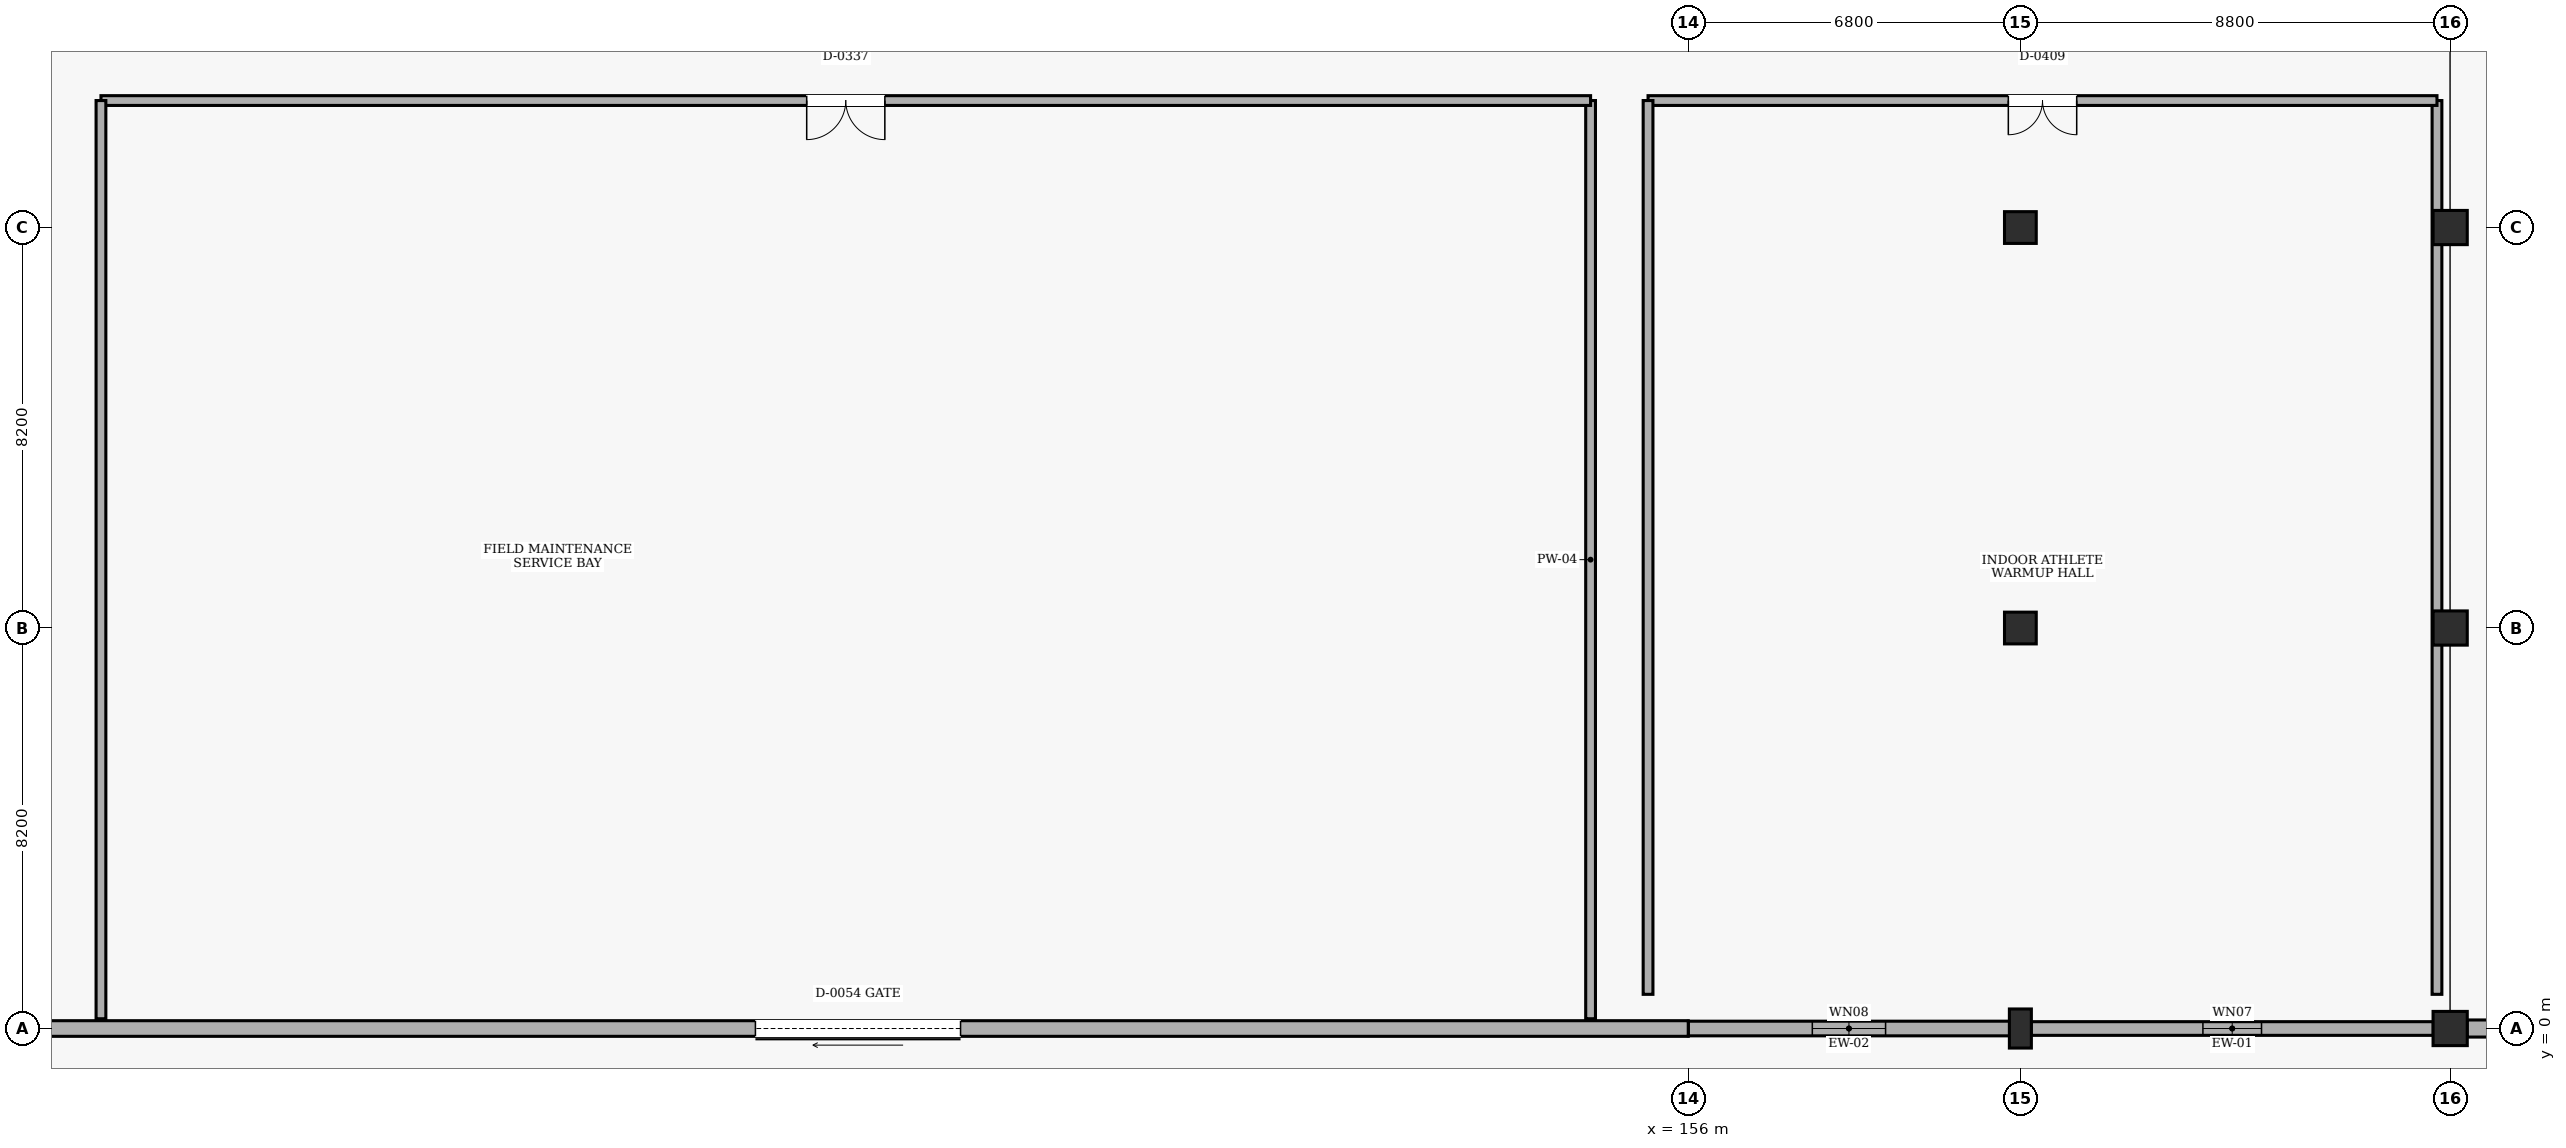
"""IFC4 building model, lengths in metres.
Left out: names, types, materials, properties, quantities, classifications, styles, units other than length and angle.
Written with IfcOpenShell. Run it as: python <this file> out.ifc"""

import sys

from ifc_helpers import new_model, si_unit, direction, frame, frame_2d, origin, origin_2d, place, context, subcontext, project, spatial, rectangle, extrude, element, fill, save


model = new_model("IFC4")
c1 = context("Model", 3, precision=1e-05, world=origin(), true_north=direction((0.0, 1.0)))
c2 = subcontext(c1, "Body", "Model", "MODEL_VIEW")
j1 = project(units=[si_unit("LENGTHUNIT", "METRE"), si_unit("PLANEANGLEUNIT", "RADIAN")], contexts=[c1])
p1 = place(None, origin())
s1 = spatial("IfcSite", under=j1, at=p1, CompositionType="ELEMENT")
p2 = place(p1, origin())
s2 = spatial("IfcBuilding", under=s1, at=p2, CompositionType="ELEMENT")
p3 = place(p2, origin())
s3 = spatial("IfcBuildingStorey", under=s2, at=p3, CompositionType="ELEMENT", Elevation=0.0)
p4 = place(p3, frame((162.8, 0.0, 0.0), z_axis=(0.0, 0.0, 1.0), x_axis=(1.0, 0.0, 0.0)))
e1 = element("IfcColumn", 1, at=p4, inside=s3, PredefinedType="PILASTER", context=c2, shape_type="SweptSolid", body=[
    extrude(rectangle(XDim=0.45, YDim=0.8, at=origin_2d()), origin(), (0.0, 0.0, 1.0), 5.4),
])
for number, where, z_axis, x_axis in (
    (2, (162.8, 8.2, 0.0), (0.0, 0.0, 1.0), (1.0, 0.0, 0.0)),
    (3, (162.8, 16.4, 0.0), (0.0, 0.0, 1.0), (1.0, 0.0, 0.0)),
):
    element("IfcColumn", number, at=place(p3, frame(where, z_axis=z_axis, x_axis=x_axis)), inside=s3, PredefinedType="COLUMN", context=c2, shape_type="SweptSolid", body=[
        extrude(rectangle(XDim=0.65, YDim=0.65, at=origin_2d()), origin(), (0.0, 0.0, 1.0), 5.4),
    ])
for number, where, z_axis, x_axis in (
    (4, (171.6, 0.0, 0.0), (0.0, 0.0, 1.0), (1.0, 0.0, 0.0)),
    (5, (171.6, 8.2, 0.0), (0.0, 0.0, 1.0), (1.0, 0.0, 0.0)),
    (6, (171.6, 16.4, 0.0), (0.0, 0.0, 1.0), (1.0, 0.0, 0.0)),
):
    element("IfcColumn", number, at=place(p3, frame(where, z_axis=z_axis, x_axis=x_axis)), inside=s3, PredefinedType="COLUMN", context=c2, shape_type="SweptSolid", body=[
        extrude(rectangle(XDim=0.7, YDim=0.7, at=origin_2d()), origin(), (0.0, 0.0, 1.0), 5.4),
    ])
p5 = place(p3, frame((180.03, 0.0, 0.0), z_axis=(0.0, 0.0, 1.0), x_axis=(-1.0, 0.0, 0.0)))
e7 = element("IfcWall", 7, at=p5, inside=s3, PredefinedType="SOLIDWALL", context=c2, shape_type="SweptSolid", body=[
    extrude(rectangle(XDim=8.085, YDim=0.35, at=frame_2d((4.042, 0.0))), origin(), (0.0, 0.0, 1.0), 4.26),
])
p6 = place(p5, frame((2.942, 0.0, 0.9)))
e8 = element("IfcOpeningElement", 8, at=p6, cuts=e7, PredefinedType="OPENING", context=c2, shape_type="SweptSolid", body=[
    extrude(rectangle(XDim=2.2, YDim=1.5, at=frame_2d((1.1, 0.75))), frame((0.0, 0.185, 0.0), z_axis=(0.0, -1.0, 0.0), x_axis=(1.0, 0.0, 0.0)), (0.0, 0.0, 1.0), 0.37),
])
p7 = place(p3, frame((171.255, 0.0, 0.0), z_axis=(0.0, 0.0, 1.0), x_axis=(-1.0, 0.0, 0.0)))
e9 = element("IfcWall", 9, at=p7, inside=s3, PredefinedType="SOLIDWALL", context=c2, shape_type="SweptSolid", body=[
    extrude(rectangle(XDim=8.235, YDim=0.28, at=frame_2d((4.117, 0.0))), origin(), (0.0, 0.0, 1.0), 4.36),
])
p8 = place(p7, frame((3.518, 0.0, 0.9)))
e10 = element("IfcOpeningElement", 10, at=p8, cuts=e9, PredefinedType="OPENING", context=c2, shape_type="SweptSolid", body=[
    extrude(rectangle(XDim=1.2, YDim=1.8, at=frame_2d((0.6, 0.9))), frame((0.0, 0.15, 0.0), z_axis=(0.0, -1.0, 0.0), x_axis=(1.0, 0.0, 0.0)), (0.0, 0.0, 1.0), 0.3),
])
p9 = place(p3, frame((162.58, 0.0, 0.0), z_axis=(0.0, 0.0, 1.0), x_axis=(-1.0, 0.0, 0.0)))
e11 = element("IfcWall", 11, at=p9, inside=s3, PredefinedType="SOLIDWALL", context=c2, shape_type="SweptSolid", body=[
    extrude(rectangle(XDim=6.58, YDim=0.3, at=frame_2d((3.29, 0.0))), origin(), (0.0, 0.0, 1.0), 5.08),
])
p10 = place(p9, frame((2.54, 0.0, 0.9)))
e12 = element("IfcOpeningElement", 12, at=p10, cuts=e11, PredefinedType="OPENING", context=c2, shape_type="SweptSolid", body=[
    extrude(rectangle(XDim=1.5, YDim=1.8, at=frame_2d((0.75, 0.9))), frame((0.0, 0.16, 0.0), z_axis=(0.0, -1.0, 0.0), x_axis=(1.0, 0.0, 0.0)), (0.0, 0.0, 1.0), 0.32),
])
p11 = place(p3, frame((156.0, 0.0, 0.0), z_axis=(0.0, 0.0, 1.0), x_axis=(-1.0, 0.0, 0.0)))
e13 = element("IfcWall", 13, at=p11, inside=s3, PredefinedType="SOLIDWALL", context=c2, shape_type="SweptSolid", body=[
    extrude(rectangle(XDim=34.0, YDim=0.32, at=frame_2d((17.0, 0.0))), origin(), (0.0, 0.0, 1.0), 5.08),
])
p12 = place(p11, frame((14.9, 0.0, 0.0)))
e14 = element("IfcOpeningElement", 14, at=p12, cuts=e13, PredefinedType="OPENING", context=c2, shape_type="SweptSolid", body=[
    extrude(rectangle(XDim=4.2, YDim=3.6, at=frame_2d((2.1, 1.8))), frame((0.0, 0.17, 0.0), z_axis=(0.0, -1.0, 0.0), x_axis=(1.0, 0.0, 0.0)), (0.0, 0.0, 1.0), 0.34),
])
p13 = place(p3, frame((154.0, 0.2, 0.0), z_axis=(0.0, 0.0, 1.0), x_axis=(0.0, 1.0, 0.0)))
e15 = element("IfcWall", 15, at=p13, inside=s3, PredefinedType="PARTITIONING", context=c2, shape_type="SweptSolid", body=[
    extrude(rectangle(XDim=18.8, YDim=0.2, at=frame_2d((9.4, 0.0))), origin(), (0.0, 0.0, 1.0), 5.08),
])
p14 = place(p3, frame((154.0, 19.0, 0.0), z_axis=(0.0, 0.0, 1.0), x_axis=(-1.0, 0.0, 0.0)))
e16 = element("IfcWall", 16, at=p14, inside=s3, PredefinedType="PARTITIONING", context=c2, shape_type="SweptSolid", body=[
    extrude(rectangle(XDim=30.5, YDim=0.2, at=frame_2d((15.25, 0.0))), origin(), (0.0, 0.0, 1.0), 5.08),
])
p15 = place(p14, frame((14.45, 0.0, 0.0)))
e17 = element("IfcOpeningElement", 17, at=p15, cuts=e16, PredefinedType="OPENING", context=c2, shape_type="SweptSolid", body=[
    extrude(rectangle(XDim=1.6, YDim=2.2, at=frame_2d((0.8, 1.1))), frame((0.0, 0.11, 0.0), z_axis=(0.0, -1.0, 0.0), x_axis=(1.0, 0.0, 0.0)), (0.0, 0.0, 1.0), 0.22),
])
p16 = place(p3, frame((123.5, 19.0, 0.0), z_axis=(0.0, 0.0, 1.0), x_axis=(0.0, -1.0, 0.0)))
e18 = element("IfcWall", 18, at=p16, inside=s3, PredefinedType="PARTITIONING", context=c2, shape_type="SweptSolid", body=[
    extrude(rectangle(XDim=18.8, YDim=0.2, at=frame_2d((9.4, 0.0))), origin(), (0.0, 0.0, 1.0), 5.08),
])
p17 = place(p3, frame((171.33, 0.7, 0.0), z_axis=(0.0, 0.0, 1.0), x_axis=(0.0, 1.0, 0.0)))
e19 = element("IfcWall", 19, at=p17, inside=s3, PredefinedType="PARTITIONING", context=c2, shape_type="SweptSolid", body=[
    extrude(rectangle(XDim=18.3, YDim=0.2, at=frame_2d((9.15, 0.0))), origin(), (0.0, 0.0, 1.0), 4.31),
])
p18 = place(p3, frame((171.33, 19.0, 0.0), z_axis=(0.0, 0.0, 1.0), x_axis=(-1.0, 0.0, 0.0)))
e20 = element("IfcWall", 20, at=p18, inside=s3, PredefinedType="PARTITIONING", context=c2, shape_type="SweptSolid", body=[
    extrude(rectangle(XDim=16.153, YDim=0.2, at=frame_2d((8.077, 0.0))), origin(), (0.0, 0.0, 1.0), 5.08),
])
p19 = place(p18, frame((7.377, 0.0, 0.0)))
e21 = element("IfcOpeningElement", 21, at=p19, cuts=e20, PredefinedType="OPENING", context=c2, shape_type="SweptSolid", body=[
    extrude(rectangle(XDim=1.4, YDim=2.2, at=frame_2d((0.7, 1.1))), frame((0.0, 0.11, 0.0), z_axis=(0.0, -1.0, 0.0), x_axis=(1.0, 0.0, 0.0)), (0.0, 0.0, 1.0), 0.22),
])
p20 = place(p3, frame((155.177, 19.0, 0.0), z_axis=(0.0, 0.0, 1.0), x_axis=(0.0, -1.0, 0.0)))
e22 = element("IfcWall", 22, at=p20, inside=s3, PredefinedType="PARTITIONING", context=c2, shape_type="SweptSolid", body=[
    extrude(rectangle(XDim=18.3, YDim=0.2, at=frame_2d((9.15, 0.0))), origin(), (0.0, 0.0, 1.0), 5.08),
])
p21 = place(p8, origin())
e23 = element("IfcWindow", 23, at=p21, inside=s3, PartitioningType="SINGLE_PANEL", PredefinedType="WINDOW", context=c2, shape_type="SweptSolid", body=[
    extrude(rectangle(XDim=1.2, YDim=1.8, at=frame_2d((0.6, 0.9))), frame((0.0, 0.03, 0.0), z_axis=(0.0, -1.0, 0.0), x_axis=(1.0, 0.0, 0.0)), (0.0, 0.0, 1.0), 0.06),
])
fill(e10, e23)
p22 = place(p10, origin())
e24 = element("IfcWindow", 24, at=p22, inside=s3, PartitioningType="SINGLE_PANEL", PredefinedType="WINDOW", context=c2, shape_type="SweptSolid", body=[
    extrude(rectangle(XDim=1.5, YDim=1.8, at=frame_2d((0.75, 0.9))), frame((0.0, 0.03, 0.0), z_axis=(0.0, -1.0, 0.0), x_axis=(1.0, 0.0, 0.0)), (0.0, 0.0, 1.0), 0.06),
])
fill(e12, e24)
p23 = place(p12, origin())
e25 = element("IfcDoor", 25, at=p23, inside=s3, OperationType="ROLLINGUP", PredefinedType="DOOR", context=c2, shape_type="SweptSolid", body=[
    extrude(rectangle(XDim=4.2, YDim=3.6, at=frame_2d((2.1, 1.8))), frame((0.0, 0.025, 0.0), z_axis=(0.0, -1.0, 0.0), x_axis=(1.0, 0.0, 0.0)), (0.0, 0.0, 1.0), 0.05),
])
fill(e14, e25)
p24 = place(p15, origin())
e26 = element("IfcDoor", 26, at=p24, inside=s3, OperationType="DOUBLE_DOOR_SINGLE_SWING", PredefinedType="DOOR", context=c2, shape_type="SweptSolid", body=[
    extrude(rectangle(XDim=1.6, YDim=2.2, at=frame_2d((0.8, 1.1))), frame((0.0, 0.025, 0.0), z_axis=(0.0, -1.0, 0.0), x_axis=(1.0, 0.0, 0.0)), (0.0, 0.0, 1.0), 0.05),
])
fill(e17, e26)
p25 = place(p19, origin())
e27 = element("IfcDoor", 27, at=p25, inside=s3, OperationType="DOUBLE_DOOR_SINGLE_SWING", PredefinedType="DOOR", context=c2, shape_type="SweptSolid", body=[
    extrude(rectangle(XDim=1.4, YDim=2.2, at=frame_2d((0.7, 1.1))), frame((0.0, 0.025, 0.0), z_axis=(0.0, -1.0, 0.0), x_axis=(1.0, 0.0, 0.0)), (0.0, 0.0, 1.0), 0.05),
])
fill(e21, e27)
save(model, sys.argv[1])
